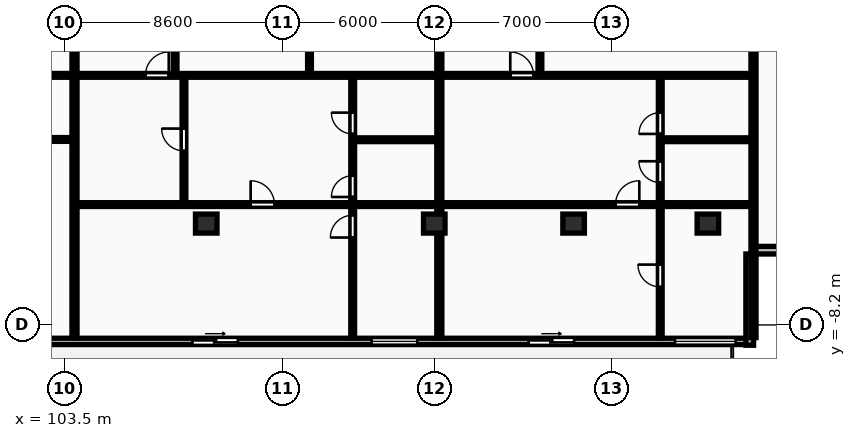
"""IFC4 building model, lengths in metres.
Left out: names, types, materials, properties, quantities, classifications, styles, units other than length and angle.
Written with IfcOpenShell. Run it as: python <this file> out.ifc"""

import sys

from ifc_helpers import new_model, si_unit, direction, frame, frame_2d, origin, origin_2d, place, context, subcontext, project, spatial, rectangle, extrude, element, fill, save


model = new_model("IFC4")
c1 = context("Model", 3, precision=1e-05, world=origin(), true_north=direction((0.0, 1.0)))
c2 = subcontext(c1, "Body", "Model", "MODEL_VIEW")
j1 = project(units=[si_unit("LENGTHUNIT", "METRE"), si_unit("PLANEANGLEUNIT", "RADIAN")], contexts=[c1])
p1 = place(None, origin())
s1 = spatial("IfcSite", under=j1, at=p1, CompositionType="ELEMENT")
p2 = place(p1, origin())
s2 = spatial("IfcBuilding", under=s1, at=p2, CompositionType="ELEMENT")
p3 = place(p2, frame((0.0, 0.0, 80.8)))
s3 = spatial("IfcBuildingStorey", under=s2, at=p3, CompositionType="ELEMENT", Elevation=80.8)
for number, where, z_axis, x_axis in (
    (1, (109.1, -4.2, 0.0), (0.0, 0.0, 1.0), (1.0, 0.0, 0.0)),
    (2, (118.1, -4.2, 0.0), (0.0, 0.0, 1.0), (1.0, 0.0, 0.0)),
    (3, (123.6, -4.2, 0.0), (0.0, 0.0, 1.0), (1.0, 0.0, 0.0)),
    (4, (128.9, -4.2, 0.0), (0.0, 0.0, 1.0), (1.0, 0.0, 0.0)),
):
    element("IfcColumn", number, at=place(p3, frame(where, z_axis=z_axis, x_axis=x_axis)), inside=s3, PredefinedType="COLUMN", context=c2, shape_type="SweptSolid", body=[
        extrude(rectangle(XDim=0.85, YDim=0.75, at=origin_2d()), origin(), (0.0, 0.0, 1.0), 3.25),
    ])
p4 = place(p3, frame((72.7, -8.85, 0.0), z_axis=(0.0, 0.0, 1.0), x_axis=(1.0, 0.0, 0.0)))
e5 = element("IfcWall", 5, at=p4, inside=s3, PredefinedType="STANDARD", context=c2, shape_type="SweptSolid", body=[
    extrude(rectangle(XDim=58.0, YDim=0.25, at=frame_2d((29.0, 0.0))), origin(), (0.0, 0.0, 1.0), 2.97),
])
p5 = place(p4, frame((2.92, 0.0, 0.0)))
e6 = element("IfcOpeningElement", 6, at=p5, cuts=e5, PredefinedType="OPENING", context=c2, shape_type="SweptSolid", body=[
    extrude(rectangle(XDim=1.8, YDim=2.2, at=frame_2d((0.9, 1.1))), frame((0.0, 0.135, 0.0), z_axis=(0.0, -1.0, 0.0), x_axis=(1.0, 0.0, 0.0)), (0.0, 0.0, 1.0), 0.27),
])
p6 = place(p4, frame((9.2, 0.0, 0.85)))
e7 = element("IfcOpeningElement", 7, at=p6, cuts=e5, PredefinedType="OPENING", context=c2, shape_type="SweptSolid", body=[
    extrude(rectangle(XDim=2.4, YDim=1.9, at=frame_2d((1.2, 0.95))), frame((0.0, 0.135, 0.0), z_axis=(0.0, -1.0, 0.0), x_axis=(1.0, 0.0, 0.0)), (0.0, 0.0, 1.0), 0.27),
])
p7 = place(p4, frame((21.7, 0.0, 0.85)))
e8 = element("IfcOpeningElement", 8, at=p7, cuts=e5, PredefinedType="OPENING", context=c2, shape_type="SweptSolid", body=[
    extrude(rectangle(XDim=2.4, YDim=1.9, at=frame_2d((1.2, 0.95))), frame((0.0, 0.135, 0.0), z_axis=(0.0, -1.0, 0.0), x_axis=(1.0, 0.0, 0.0)), (0.0, 0.0, 1.0), 0.27),
])
p8 = place(p4, frame((16.0, 0.0, 0.0)))
e9 = element("IfcOpeningElement", 9, at=p8, cuts=e5, PredefinedType="OPENING", context=c2, shape_type="SweptSolid", body=[
    extrude(rectangle(XDim=1.8, YDim=2.2, at=frame_2d((0.9, 1.1))), frame((0.0, 0.135, 0.0), z_axis=(0.0, -1.0, 0.0), x_axis=(1.0, 0.0, 0.0)), (0.0, 0.0, 1.0), 0.27),
])
p9 = place(p4, frame((27.1, 0.0, 0.85)))
e10 = element("IfcOpeningElement", 10, at=p9, cuts=e5, PredefinedType="OPENING", context=c2, shape_type="SweptSolid", body=[
    extrude(rectangle(XDim=2.4, YDim=1.9, at=frame_2d((1.2, 0.95))), frame((0.0, 0.135, 0.0), z_axis=(0.0, -1.0, 0.0), x_axis=(1.0, 0.0, 0.0)), (0.0, 0.0, 1.0), 0.27),
])
p10 = place(p4, frame((35.85, 0.0, 0.0)))
e11 = element("IfcOpeningElement", 11, at=p10, cuts=e5, PredefinedType="OPENING", context=c2, shape_type="SweptSolid", body=[
    extrude(rectangle(XDim=1.8, YDim=2.2, at=frame_2d((0.9, 1.1))), frame((0.0, 0.135, 0.0), z_axis=(0.0, -1.0, 0.0), x_axis=(1.0, 0.0, 0.0)), (0.0, 0.0, 1.0), 0.27),
])
p11 = place(p4, frame((42.93, 0.0, 0.85)))
e12 = element("IfcOpeningElement", 12, at=p11, cuts=e5, PredefinedType="OPENING", context=c2, shape_type="SweptSolid", body=[
    extrude(rectangle(XDim=1.8, YDim=1.8, at=frame_2d((0.9, 0.9))), frame((0.0, 0.135, 0.0), z_axis=(0.0, -1.0, 0.0), x_axis=(1.0, 0.0, 0.0)), (0.0, 0.0, 1.0), 0.27),
])
p12 = place(p4, frame((49.12, 0.0, 0.0)))
e13 = element("IfcOpeningElement", 13, at=p12, cuts=e5, PredefinedType="OPENING", context=c2, shape_type="SweptSolid", body=[
    extrude(rectangle(XDim=1.8, YDim=2.2, at=frame_2d((0.9, 1.1))), frame((0.0, 0.135, 0.0), z_axis=(0.0, -1.0, 0.0), x_axis=(1.0, 0.0, 0.0)), (0.0, 0.0, 1.0), 0.27),
])
p13 = place(p4, frame((54.9, 0.0, 0.85)))
e14 = element("IfcOpeningElement", 14, at=p13, cuts=e5, PredefinedType="OPENING", context=c2, shape_type="SweptSolid", body=[
    extrude(rectangle(XDim=2.4, YDim=1.9, at=frame_2d((1.2, 0.95))), frame((0.0, 0.135, 0.0), z_axis=(0.0, -1.0, 0.0), x_axis=(1.0, 0.0, 0.0)), (0.0, 0.0, 1.0), 0.27),
])
for number, where, z_axis, x_axis in (
    (15, (130.55, -9.0, 0.0), (0.0, 0.0, 1.0), (0.0, 1.0, 0.0)),
    (16, (130.7, -5.25, 0.0), (0.0, 0.0, 1.0), (1.0, 0.0, 0.0)),
):
    element("IfcWall", number, at=place(p3, frame(where, z_axis=z_axis, x_axis=x_axis)), inside=s3, PredefinedType="STANDARD", context=c2, shape_type="SweptSolid", body=[
        extrude(rectangle(XDim=3.6, YDim=0.3, at=frame_2d((1.8, 0.0))), origin(), (0.0, 0.0, 1.0), 2.97),
    ])
for number, where, z_axis, x_axis in (
    (17, (130.7, -8.7, 0.0), (0.0, 0.0, 1.0), (0.0, 1.0, 0.0)),
    (18, (103.9, -8.7, 0.0), (0.0, 0.0, 1.0), (0.0, 1.0, 0.0)),
):
    element("IfcWall", number, at=place(p3, frame(where, z_axis=z_axis, x_axis=x_axis)), inside=s3, PredefinedType="PARTITIONING", context=c2, shape_type="SweptSolid", body=[
        extrude(rectangle(XDim=24.87, YDim=0.2, at=frame_2d((12.435, 0.0))), origin(), (0.0, 0.0, 1.0), 2.97),
    ])
p14 = place(p3, frame((93.02, -0.88, 0.0), z_axis=(0.0, 0.0, 1.0), x_axis=(1.0, 0.0, 0.0)))
e19 = element("IfcWall", 19, at=p14, inside=s3, PredefinedType="PARTITIONING", context=c2, shape_type="SweptSolid", body=[
    extrude(rectangle(XDim=10.8, YDim=0.15, at=frame_2d((5.4, 0.0))), origin(), (0.0, 0.0, 1.0), 2.97),
])
p15 = place(p14, frame((4.11, 0.0, 0.0)))
e20 = element("IfcOpeningElement", 20, at=p15, cuts=e19, PredefinedType="OPENING", context=c2, shape_type="SweptSolid", body=[
    extrude(rectangle(XDim=0.84, YDim=2.04, at=frame_2d((0.42, 1.02))), frame((0.0, 0.085, 0.0), z_axis=(0.0, -1.0, 0.0), x_axis=(1.0, 0.0, 0.0)), (0.0, 0.0, 1.0), 0.17),
])
p16 = place(p14, frame((5.45, 0.0, 0.0)))
e21 = element("IfcOpeningElement", 21, at=p16, cuts=e19, PredefinedType="OPENING", context=c2, shape_type="SweptSolid", body=[
    extrude(rectangle(XDim=0.84, YDim=2.04, at=frame_2d((0.42, 1.02))), frame((0.0, 0.085, 0.0), z_axis=(0.0, -1.0, 0.0), x_axis=(1.0, 0.0, 0.0)), (0.0, 0.0, 1.0), 0.17),
])
p17 = place(p3, frame((86.18, 1.65, 0.0), z_axis=(0.0, 0.0, 1.0), x_axis=(1.0, 0.0, 0.0)))
e22 = element("IfcWall", 22, at=p17, inside=s3, PredefinedType="PARTITIONING", context=c2, shape_type="SweptSolid", body=[
    extrude(rectangle(XDim=17.64, YDim=0.15, at=frame_2d((8.82, 0.0))), origin(), (0.0, 0.0, 1.0), 2.97),
])
p18 = place(p17, frame((2.72, 0.0, 0.0)))
e23 = element("IfcOpeningElement", 23, at=p18, cuts=e22, PredefinedType="OPENING", context=c2, shape_type="SweptSolid", body=[
    extrude(rectangle(XDim=0.92, YDim=2.08, at=frame_2d((0.46, 1.04))), frame((0.0, 0.085, 0.0), z_axis=(0.0, -1.0, 0.0), x_axis=(1.0, 0.0, 0.0)), (0.0, 0.0, 1.0), 0.17),
])
p19 = place(p3, frame((118.3, -8.7, 0.0), z_axis=(0.0, 0.0, 1.0), x_axis=(0.0, 1.0, 0.0)))
e24 = element("IfcWall", 24, at=p19, inside=s3, PredefinedType="PARTITIONING", context=c2, shape_type="SweptSolid", body=[
    extrude(rectangle(XDim=24.87, YDim=0.2, at=frame_2d((12.435, 0.0))), origin(), (0.0, 0.0, 1.0), 2.2),
])
p20 = place(p3, frame((113.175, 1.69, 0.0), z_axis=(0.0, 0.0, 1.0), x_axis=(0.0, 1.0, 0.0)))
e25 = element("IfcWall", 25, at=p20, inside=s3, PredefinedType="PARTITIONING", context=c2, shape_type="SweptSolid", body=[
    extrude(rectangle(XDim=7.07, YDim=0.15, at=frame_2d((3.535, 0.0))), origin(), (0.0, 0.0, 1.0), 2.97),
])
p21 = place(p20, frame((3.115, 0.0, 0.0)))
e26 = element("IfcOpeningElement", 26, at=p21, cuts=e25, PredefinedType="OPENING", context=c2, shape_type="SweptSolid", body=[
    extrude(rectangle(XDim=0.84, YDim=2.04, at=frame_2d((0.42, 1.02))), frame((0.0, 0.085, 0.0), z_axis=(0.0, -1.0, 0.0), x_axis=(1.0, 0.0, 0.0)), (0.0, 0.0, 1.0), 0.17),
])
p22 = place(p3, frame((107.87, 1.69, 0.0), z_axis=(0.0, 0.0, 1.0), x_axis=(0.0, 1.0, 0.0)))
e27 = element("IfcWall", 27, at=p22, inside=s3, PredefinedType="PARTITIONING", context=c2, shape_type="SweptSolid", body=[
    extrude(rectangle(XDim=14.5, YDim=0.15, at=frame_2d((7.25, 0.0))), origin(), (0.0, 0.0, 1.0), 2.97),
])
p23 = place(p22, frame((2.586, 0.0, 0.0)))
e28 = element("IfcOpeningElement", 28, at=p23, cuts=e27, PredefinedType="OPENING", context=c2, shape_type="SweptSolid", body=[
    extrude(rectangle(XDim=0.88, YDim=2.06, at=frame_2d((0.44, 1.03))), frame((0.0, 0.085, 0.0), z_axis=(0.0, -1.0, 0.0), x_axis=(1.0, 0.0, 0.0)), (0.0, 0.0, 1.0), 0.17),
])
p24 = place(p3, frame((108.22, -3.39, 0.0), z_axis=(0.0, 0.0, 1.0), x_axis=(0.0, 1.0, 0.0)))
e29 = element("IfcWall", 29, at=p24, inside=s3, PredefinedType="PARTITIONING", context=c2, shape_type="SweptSolid", body=[
    extrude(rectangle(XDim=5.0, YDim=0.15, at=frame_2d((2.5, 0.0))), origin(), (0.0, 0.0, 1.0), 2.97),
])
p25 = place(p24, frame((2.06, 0.0, 0.0)))
e30 = element("IfcOpeningElement", 30, at=p25, cuts=e29, PredefinedType="OPENING", context=c2, shape_type="SweptSolid", body=[
    extrude(rectangle(XDim=0.88, YDim=2.06, at=frame_2d((0.44, 1.03))), frame((0.0, 0.085, 0.0), z_axis=(0.0, -1.0, 0.0), x_axis=(1.0, 0.0, 0.0)), (0.0, 0.0, 1.0), 0.17),
])
p26 = place(p3, frame((114.94, -0.89, 0.0), z_axis=(0.0, 0.0, 1.0), x_axis=(1.0, 0.0, 0.0)))
e31 = element("IfcWall", 31, at=p26, inside=s3, PredefinedType="PARTITIONING", context=c2, shape_type="SweptSolid", body=[
    extrude(rectangle(XDim=3.28, YDim=0.15, at=frame_2d((1.64, 0.0))), origin(), (0.0, 0.0, 1.0), 2.97),
])
p27 = place(p3, frame((114.88, -8.7, 0.0), z_axis=(0.0, 0.0, 1.0), x_axis=(0.0, 1.0, 0.0)))
e32 = element("IfcWall", 32, at=p27, inside=s3, PredefinedType="PARTITIONING", context=c2, shape_type="SweptSolid", body=[
    extrude(rectangle(XDim=10.31, YDim=0.15, at=frame_2d((5.155, 0.0))), origin(), (0.0, 0.0, 1.0), 2.97),
])
p28 = place(p27, frame((5.55, 0.0, 0.0)))
e33 = element("IfcOpeningElement", 33, at=p28, cuts=e32, PredefinedType="OPENING", context=c2, shape_type="SweptSolid", body=[
    extrude(rectangle(XDim=0.84, YDim=2.04, at=frame_2d((0.42, 1.02))), frame((0.0, 0.085, 0.0), z_axis=(0.0, -1.0, 0.0), x_axis=(1.0, 0.0, 0.0)), (0.0, 0.0, 1.0), 0.17),
])
p29 = place(p27, frame((8.04, 0.0, 0.0)))
e34 = element("IfcOpeningElement", 34, at=p29, cuts=e32, PredefinedType="OPENING", context=c2, shape_type="SweptSolid", body=[
    extrude(rectangle(XDim=0.84, YDim=2.04, at=frame_2d((0.42, 1.02))), frame((0.0, 0.085, 0.0), z_axis=(0.0, -1.0, 0.0), x_axis=(1.0, 0.0, 0.0)), (0.0, 0.0, 1.0), 0.17),
])
p30 = place(p27, frame((3.95, 0.0, 0.0)))
e35 = element("IfcOpeningElement", 35, at=p30, cuts=e32, PredefinedType="OPENING", context=c2, shape_type="SweptSolid", body=[
    extrude(rectangle(XDim=0.88, YDim=2.06, at=frame_2d((0.44, 1.03))), frame((0.0, 0.085, 0.0), z_axis=(0.0, -1.0, 0.0), x_axis=(1.0, 0.0, 0.0)), (0.0, 0.0, 1.0), 0.17),
])
p31 = place(p3, frame((103.98, 1.65, 0.0), z_axis=(0.0, 0.0, 1.0), x_axis=(1.0, 0.0, 0.0)))
e36 = element("IfcWall", 36, at=p31, inside=s3, PredefinedType="PARTITIONING", context=c2, shape_type="SweptSolid", body=[
    extrude(rectangle(XDim=14.24, YDim=0.15, at=frame_2d((7.12, 0.0))), origin(), (0.0, 0.0, 1.0), 2.97),
])
p32 = place(p31, frame((2.72, 0.0, 0.0)))
e37 = element("IfcOpeningElement", 37, at=p32, cuts=e36, PredefinedType="OPENING", context=c2, shape_type="SweptSolid", body=[
    extrude(rectangle(XDim=0.92, YDim=2.08, at=frame_2d((0.46, 1.04))), frame((0.0, 0.085, 0.0), z_axis=(0.0, -1.0, 0.0), x_axis=(1.0, 0.0, 0.0)), (0.0, 0.0, 1.0), 0.17),
])
p33 = place(p3, frame((103.98, -3.45, 0.0), z_axis=(0.0, 0.0, 1.0), x_axis=(1.0, 0.0, 0.0)))
e38 = element("IfcWall", 38, at=p33, inside=s3, PredefinedType="PARTITIONING", context=c2, shape_type="SweptSolid", body=[
    extrude(rectangle(XDim=14.24, YDim=0.15, at=frame_2d((7.12, 0.0))), origin(), (0.0, 0.0, 1.0), 2.97),
])
p34 = place(p33, frame((6.872, 0.0, 0.0)))
e39 = element("IfcOpeningElement", 39, at=p34, cuts=e38, PredefinedType="OPENING", context=c2, shape_type="SweptSolid", body=[
    extrude(rectangle(XDim=0.94, YDim=2.1, at=frame_2d((0.47, 1.05))), frame((0.0, 0.085, 0.0), z_axis=(0.0, -1.0, 0.0), x_axis=(1.0, 0.0, 0.0)), (0.0, 0.0, 1.0), 0.17),
])
p35 = place(p3, frame((122.27, 1.69, 0.0), z_axis=(0.0, 0.0, 1.0), x_axis=(0.0, 1.0, 0.0)))
e40 = element("IfcWall", 40, at=p35, inside=s3, PredefinedType="PARTITIONING", context=c2, shape_type="SweptSolid", body=[
    extrude(rectangle(XDim=14.5, YDim=0.15, at=frame_2d((7.25, 0.0))), origin(), (0.0, 0.0, 1.0), 2.97),
])
p36 = place(p35, frame((2.542, 0.0, 0.0)))
e41 = element("IfcOpeningElement", 41, at=p36, cuts=e40, PredefinedType="OPENING", context=c2, shape_type="SweptSolid", body=[
    extrude(rectangle(XDim=0.88, YDim=2.06, at=frame_2d((0.44, 1.03))), frame((0.0, 0.085, 0.0), z_axis=(0.0, -1.0, 0.0), x_axis=(1.0, 0.0, 0.0)), (0.0, 0.0, 1.0), 0.17),
])
p37 = place(p3, frame((127.08, -0.89, 0.0), z_axis=(0.0, 0.0, 1.0), x_axis=(1.0, 0.0, 0.0)))
e42 = element("IfcWall", 42, at=p37, inside=s3, PredefinedType="PARTITIONING", context=c2, shape_type="SweptSolid", body=[
    extrude(rectangle(XDim=3.54, YDim=0.15, at=frame_2d((1.77, 0.0))), origin(), (0.0, 0.0, 1.0), 2.97),
])
p38 = place(p3, frame((127.02, -8.7, 0.0), z_axis=(0.0, 0.0, 1.0), x_axis=(0.0, 1.0, 0.0)))
e43 = element("IfcWall", 43, at=p38, inside=s3, PredefinedType="PARTITIONING", context=c2, shape_type="SweptSolid", body=[
    extrude(rectangle(XDim=10.31, YDim=0.15, at=frame_2d((5.155, 0.0))), origin(), (0.0, 0.0, 1.0), 2.97),
])
p39 = place(p38, frame((6.12, 0.0, 0.0)))
e44 = element("IfcOpeningElement", 44, at=p39, cuts=e43, PredefinedType="OPENING", context=c2, shape_type="SweptSolid", body=[
    extrude(rectangle(XDim=0.84, YDim=2.04, at=frame_2d((0.42, 1.02))), frame((0.0, 0.085, 0.0), z_axis=(0.0, -1.0, 0.0), x_axis=(1.0, 0.0, 0.0)), (0.0, 0.0, 1.0), 0.17),
])
p40 = place(p38, frame((8.04, 0.0, 0.0)))
e45 = element("IfcOpeningElement", 45, at=p40, cuts=e43, PredefinedType="OPENING", context=c2, shape_type="SweptSolid", body=[
    extrude(rectangle(XDim=0.84, YDim=2.04, at=frame_2d((0.42, 1.02))), frame((0.0, 0.085, 0.0), z_axis=(0.0, -1.0, 0.0), x_axis=(1.0, 0.0, 0.0)), (0.0, 0.0, 1.0), 0.17),
])
p41 = place(p38, frame((2.001, 0.0, 0.0)))
e46 = element("IfcOpeningElement", 46, at=p41, cuts=e43, PredefinedType="OPENING", context=c2, shape_type="SweptSolid", body=[
    extrude(rectangle(XDim=0.88, YDim=2.06, at=frame_2d((0.44, 1.03))), frame((0.0, 0.085, 0.0), z_axis=(0.0, -1.0, 0.0), x_axis=(1.0, 0.0, 0.0)), (0.0, 0.0, 1.0), 0.17),
])
p42 = place(p3, frame((118.38, 1.65, 0.0), z_axis=(0.0, 0.0, 1.0), x_axis=(1.0, 0.0, 0.0)))
e47 = element("IfcWall", 47, at=p42, inside=s3, PredefinedType="PARTITIONING", context=c2, shape_type="SweptSolid", body=[
    extrude(rectangle(XDim=12.24, YDim=0.15, at=frame_2d((6.12, 0.0))), origin(), (0.0, 0.0, 1.0), 2.97),
])
p43 = place(p42, frame((2.72, 0.0, 0.0)))
e48 = element("IfcOpeningElement", 48, at=p43, cuts=e47, PredefinedType="OPENING", context=c2, shape_type="SweptSolid", body=[
    extrude(rectangle(XDim=0.92, YDim=2.08, at=frame_2d((0.46, 1.04))), frame((0.0, 0.085, 0.0), z_axis=(0.0, -1.0, 0.0), x_axis=(1.0, 0.0, 0.0)), (0.0, 0.0, 1.0), 0.17),
])
p44 = place(p3, frame((118.38, -3.45, 0.0), z_axis=(0.0, 0.0, 1.0), x_axis=(1.0, 0.0, 0.0)))
e49 = element("IfcWall", 49, at=p44, inside=s3, PredefinedType="PARTITIONING", context=c2, shape_type="SweptSolid", body=[
    extrude(rectangle(XDim=12.24, YDim=0.15, at=frame_2d((6.12, 0.0))), origin(), (0.0, 0.0, 1.0), 2.97),
])
p45 = place(p44, frame((6.874, 0.0, 0.0)))
e50 = element("IfcOpeningElement", 50, at=p45, cuts=e49, PredefinedType="OPENING", context=c2, shape_type="SweptSolid", body=[
    extrude(rectangle(XDim=0.94, YDim=2.1, at=frame_2d((0.47, 1.05))), frame((0.0, 0.085, 0.0), z_axis=(0.0, -1.0, 0.0), x_axis=(1.0, 0.0, 0.0)), (0.0, 0.0, 1.0), 0.17),
])
p46 = place(p10, origin())
e51 = element("IfcDoor", 51, at=p46, inside=s3, OperationType="SLIDING_TO_RIGHT", PredefinedType="DOOR", context=c2, shape_type="SweptSolid", body=[
    extrude(rectangle(XDim=1.8, YDim=2.2, at=frame_2d((0.9, 1.1))), frame((0.0, 0.025, 0.0), z_axis=(0.0, -1.0, 0.0), x_axis=(1.0, 0.0, 0.0)), (0.0, 0.0, 1.0), 0.05),
])
fill(e11, e51)
p47 = place(p11, origin())
e52 = element("IfcWindow", 52, at=p47, inside=s3, PartitioningType="SINGLE_PANEL", PredefinedType="WINDOW", context=c2, shape_type="SweptSolid", body=[
    extrude(rectangle(XDim=1.8, YDim=1.8, at=frame_2d((0.9, 0.9))), frame((0.0, 0.03, 0.0), z_axis=(0.0, -1.0, 0.0), x_axis=(1.0, 0.0, 0.0)), (0.0, 0.0, 1.0), 0.06),
])
fill(e12, e52)
p48 = place(p12, origin())
e53 = element("IfcDoor", 53, at=p48, inside=s3, OperationType="SLIDING_TO_RIGHT", PredefinedType="DOOR", context=c2, shape_type="SweptSolid", body=[
    extrude(rectangle(XDim=1.8, YDim=2.2, at=frame_2d((0.9, 1.1))), frame((0.0, 0.025, 0.0), z_axis=(0.0, -1.0, 0.0), x_axis=(1.0, 0.0, 0.0)), (0.0, 0.0, 1.0), 0.05),
])
fill(e13, e53)
p49 = place(p13, origin())
e54 = element("IfcWindow", 54, at=p49, inside=s3, PartitioningType="DOUBLE_PANEL_VERTICAL", PredefinedType="WINDOW", context=c2, shape_type="SweptSolid", body=[
    extrude(rectangle(XDim=2.4, YDim=1.9, at=frame_2d((1.2, 0.95))), frame((0.0, 0.03, 0.0), z_axis=(0.0, -1.0, 0.0), x_axis=(1.0, 0.0, 0.0)), (0.0, 0.0, 1.0), 0.06),
])
fill(e14, e54)
p50 = place(p25, origin())
e55 = element("IfcDoor", 55, at=p50, inside=s3, OperationType="SINGLE_SWING_RIGHT", PredefinedType="DOOR", context=c2, shape_type="SweptSolid", body=[
    extrude(rectangle(XDim=0.88, YDim=2.06, at=frame_2d((0.44, 1.03))), frame((0.0, 0.025, 0.0), z_axis=(0.0, -1.0, 0.0), x_axis=(1.0, 0.0, 0.0)), (0.0, 0.0, 1.0), 0.05),
])
fill(e30, e55)
p51 = place(p28, origin())
e56 = element("IfcDoor", 56, at=p51, inside=s3, OperationType="SINGLE_SWING_LEFT", PredefinedType="DOOR", context=c2, shape_type="SweptSolid", body=[
    extrude(rectangle(XDim=0.84, YDim=2.04, at=frame_2d((0.42, 1.02))), frame((0.0, 0.025, 0.0), z_axis=(0.0, -1.0, 0.0), x_axis=(1.0, 0.0, 0.0)), (0.0, 0.0, 1.0), 0.05),
])
fill(e33, e56)
p52 = place(p29, origin())
e57 = element("IfcDoor", 57, at=p52, inside=s3, OperationType="SINGLE_SWING_RIGHT", PredefinedType="DOOR", context=c2, shape_type="SweptSolid", body=[
    extrude(rectangle(XDim=0.84, YDim=2.04, at=frame_2d((0.42, 1.02))), frame((0.0, 0.025, 0.0), z_axis=(0.0, -1.0, 0.0), x_axis=(1.0, 0.0, 0.0)), (0.0, 0.0, 1.0), 0.05),
])
fill(e34, e57)
p53 = place(p30, origin())
e58 = element("IfcDoor", 58, at=p53, inside=s3, OperationType="SINGLE_SWING_LEFT", PredefinedType="DOOR", context=c2, shape_type="SweptSolid", body=[
    extrude(rectangle(XDim=0.88, YDim=2.06, at=frame_2d((0.44, 1.03))), frame((0.0, 0.025, 0.0), z_axis=(0.0, -1.0, 0.0), x_axis=(1.0, 0.0, 0.0)), (0.0, 0.0, 1.0), 0.05),
])
fill(e35, e58)
p54 = place(p32, origin())
e59 = element("IfcDoor", 59, at=p54, inside=s3, OperationType="SINGLE_SWING_RIGHT", PredefinedType="DOOR", context=c2, shape_type="SweptSolid", body=[
    extrude(rectangle(XDim=0.92, YDim=2.08, at=frame_2d((0.46, 1.04))), frame((0.0, 0.025, 0.0), z_axis=(0.0, -1.0, 0.0), x_axis=(1.0, 0.0, 0.0)), (0.0, 0.0, 1.0), 0.05),
])
fill(e37, e59)
p55 = place(p34, origin())
e60 = element("IfcDoor", 60, at=p55, inside=s3, OperationType="SINGLE_SWING_LEFT", PredefinedType="DOOR", context=c2, shape_type="SweptSolid", body=[
    extrude(rectangle(XDim=0.94, YDim=2.1, at=frame_2d((0.47, 1.05))), frame((0.0, 0.025, 0.0), z_axis=(0.0, -1.0, 0.0), x_axis=(1.0, 0.0, 0.0)), (0.0, 0.0, 1.0), 0.05),
])
fill(e39, e60)
p56 = place(p39, origin())
e61 = element("IfcDoor", 61, at=p56, inside=s3, OperationType="SINGLE_SWING_RIGHT", PredefinedType="DOOR", context=c2, shape_type="SweptSolid", body=[
    extrude(rectangle(XDim=0.84, YDim=2.04, at=frame_2d((0.42, 1.02))), frame((0.0, 0.025, 0.0), z_axis=(0.0, -1.0, 0.0), x_axis=(1.0, 0.0, 0.0)), (0.0, 0.0, 1.0), 0.05),
])
fill(e44, e61)
p57 = place(p40, origin())
e62 = element("IfcDoor", 62, at=p57, inside=s3, OperationType="SINGLE_SWING_LEFT", PredefinedType="DOOR", context=c2, shape_type="SweptSolid", body=[
    extrude(rectangle(XDim=0.84, YDim=2.04, at=frame_2d((0.42, 1.02))), frame((0.0, 0.025, 0.0), z_axis=(0.0, -1.0, 0.0), x_axis=(1.0, 0.0, 0.0)), (0.0, 0.0, 1.0), 0.05),
])
fill(e45, e62)
p58 = place(p41, origin())
e63 = element("IfcDoor", 63, at=p58, inside=s3, OperationType="SINGLE_SWING_RIGHT", PredefinedType="DOOR", context=c2, shape_type="SweptSolid", body=[
    extrude(rectangle(XDim=0.88, YDim=2.06, at=frame_2d((0.44, 1.03))), frame((0.0, 0.025, 0.0), z_axis=(0.0, -1.0, 0.0), x_axis=(1.0, 0.0, 0.0)), (0.0, 0.0, 1.0), 0.05),
])
fill(e46, e63)
p59 = place(p43, origin())
e64 = element("IfcDoor", 64, at=p59, inside=s3, OperationType="SINGLE_SWING_LEFT", PredefinedType="DOOR", context=c2, shape_type="SweptSolid", body=[
    extrude(rectangle(XDim=0.92, YDim=2.08, at=frame_2d((0.46, 1.04))), frame((0.0, 0.025, 0.0), z_axis=(0.0, -1.0, 0.0), x_axis=(1.0, 0.0, 0.0)), (0.0, 0.0, 1.0), 0.05),
])
fill(e48, e64)
p60 = place(p45, origin())
e65 = element("IfcDoor", 65, at=p60, inside=s3, OperationType="SINGLE_SWING_RIGHT", PredefinedType="DOOR", context=c2, shape_type="SweptSolid", body=[
    extrude(rectangle(XDim=0.94, YDim=2.1, at=frame_2d((0.47, 1.05))), frame((0.0, 0.025, 0.0), z_axis=(0.0, -1.0, 0.0), x_axis=(1.0, 0.0, 0.0)), (0.0, 0.0, 1.0), 0.05),
])
fill(e50, e65)
save(model, sys.argv[1])
